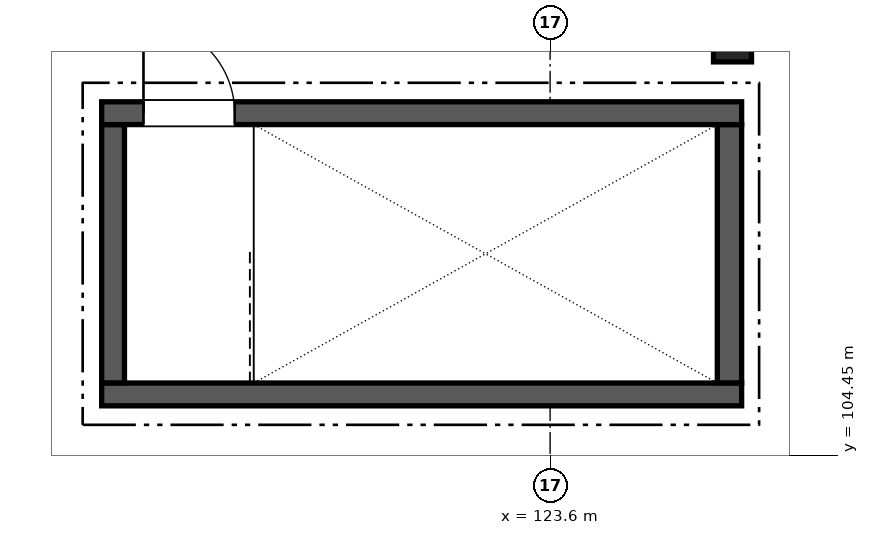
"""IFC4 building model, lengths in metres.
Left out: names, types, materials, properties, quantities, classifications, styles, units other than length and angle.
Written with IfcOpenShell. Run it as: python <this file> out.ifc"""

import sys

from ifc_helpers import new_model, si_unit, direction, frame, frame_2d, origin, origin_2d, place, context, subcontext, project, spatial, rectangle, extrude, element, fill, save


model = new_model("IFC4")
c1 = context("Model", 3, precision=1e-05, world=origin(), true_north=direction((0.0, 1.0)))
c2 = subcontext(c1, "Body", "Model", "MODEL_VIEW")
j1 = project(units=[si_unit("LENGTHUNIT", "METRE"), si_unit("PLANEANGLEUNIT", "RADIAN")], contexts=[c1])
p1 = place(None, origin())
s1 = spatial("IfcSite", under=j1, at=p1, CompositionType="ELEMENT")
p2 = place(p1, origin())
s2 = spatial("IfcBuilding", under=s1, at=p2, CompositionType="ELEMENT")
p3 = place(p2, frame((0.0, 0.0, 13.6)))
s3 = spatial("IfcBuildingStorey", under=s2, at=p3, CompositionType="ELEMENT", Elevation=13.6)
p4 = place(p3, frame((126.0, 110.0, 0.0), z_axis=(0.0, 0.0, 1.0), x_axis=(1.0, 0.0, 0.0)))
e1 = element("IfcColumn", 1, at=p4, inside=s3, PredefinedType="COLUMN", context=c2, shape_type="SweptSolid", body=[
    extrude(rectangle(XDim=0.5, YDim=0.75, at=origin_2d()), origin(), (0.0, 0.0, 1.0), 4.08),
])
p5 = place(p3, frame((117.7, 105.25, 0.0), z_axis=(0.0, 0.0, 1.0), x_axis=(1.0, 0.0, 0.0)))
e2 = element("IfcWall", 2, at=p5, inside=s3, PredefinedType="SHEAR", context=c2, shape_type="SweptSolid", body=[
    extrude(rectangle(XDim=8.42, YDim=0.3, at=frame_2d((4.21, 0.0))), origin(), (0.0, 0.0, 1.0), 3.775),
])
p6 = place(p3, frame((117.7, 108.95, 0.0), z_axis=(0.0, 0.0, 1.0), x_axis=(1.0, 0.0, 0.0)))
e3 = element("IfcWall", 3, at=p6, inside=s3, PredefinedType="SHEAR", context=c2, shape_type="SweptSolid", body=[
    extrude(rectangle(XDim=8.42, YDim=0.3, at=frame_2d((4.21, 0.0))), origin(), (0.0, 0.0, 1.0), 3.775),
])
p7 = place(p6, frame((0.55, 0.0, 0.0)))
e4 = element("IfcOpeningElement", 4, at=p7, cuts=e3, PredefinedType="OPENING", context=c2, shape_type="SweptSolid", body=[
    extrude(rectangle(XDim=1.2, YDim=2.2, at=frame_2d((0.6, 1.1))), frame((0.0, 0.16, 0.0), z_axis=(0.0, -1.0, 0.0), x_axis=(1.0, 0.0, 0.0)), (0.0, 0.0, 1.0), 0.32),
])
p8 = place(p3, frame((117.85, 105.402, 0.0), z_axis=(0.0, 0.0, 1.0), x_axis=(0.0, 1.0, 0.0)))
e5 = element("IfcWall", 5, at=p8, inside=s3, PredefinedType="SHEAR", context=c2, shape_type="SweptSolid", body=[
    extrude(rectangle(XDim=3.396, YDim=0.3, at=frame_2d((1.698, 0.0))), origin(), (0.0, 0.0, 1.0), 3.775),
])
p9 = place(p3, frame((125.96, 105.402, 0.0), z_axis=(0.0, 0.0, 1.0), x_axis=(0.0, 1.0, 0.0)))
e6 = element("IfcWall", 6, at=p9, inside=s3, PredefinedType="SHEAR", context=c2, shape_type="SweptSolid", body=[
    extrude(rectangle(XDim=3.396, YDim=0.32, at=frame_2d((1.698, 0.0))), origin(), (0.0, 0.0, 1.0), 3.775),
])
p10 = place(p7, origin())
e7 = element("IfcDoor", 7, at=p10, inside=s3, OperationType="SINGLE_SWING_LEFT", PredefinedType="DOOR", context=c2, shape_type="SweptSolid", body=[
    extrude(rectangle(XDim=1.2, YDim=2.2, at=frame_2d((0.6, 1.1))), frame((0.0, 0.025, 0.0), z_axis=(0.0, -1.0, 0.0), x_axis=(1.0, 0.0, 0.0)), (0.0, 0.0, 1.0), 0.05),
])
fill(e4, e7)
save(model, sys.argv[1])
